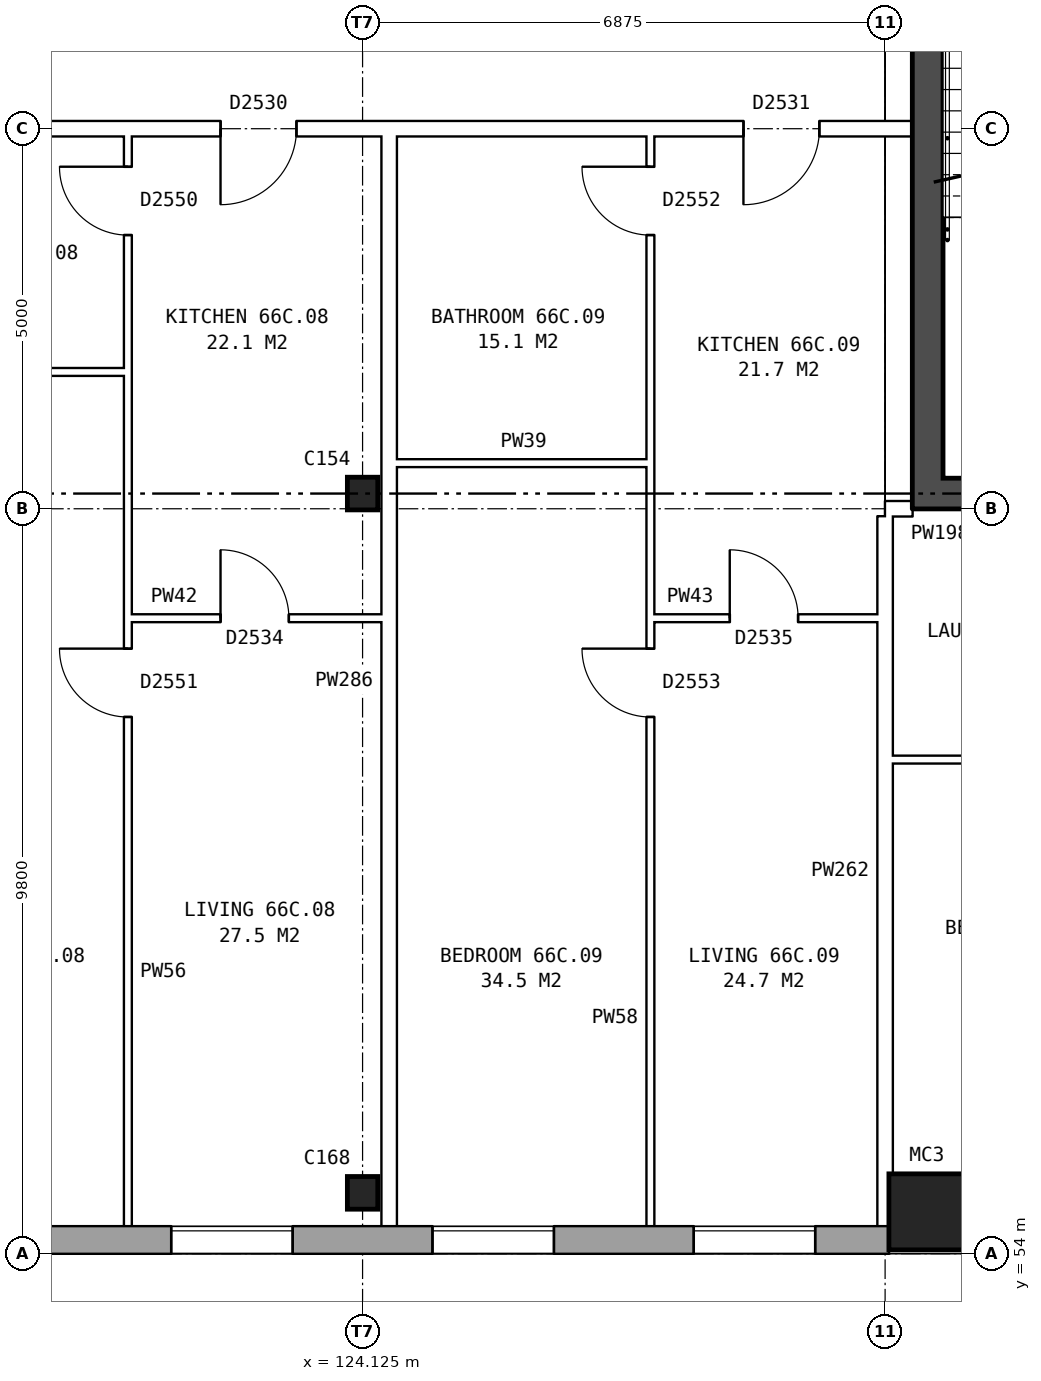
"""IFC4 building model, lengths in metres.
Left out: names, types, materials, properties, quantities, classifications, styles, units other than length and angle.
Written with IfcOpenShell. Run it as: python <this file> out.ifc"""

import sys

from ifc_helpers import new_model, si_unit, direction, frame, frame_2d, origin, origin_2d, place, context, subcontext, project, spatial, rectangle, hollow_rectangle, i_section, extrude, element, fill, save


model = new_model("IFC4")
c1 = context("Model", 3, precision=1e-05, world=origin(), true_north=direction((0.0, 1.0)))
c2 = subcontext(c1, "Body", "Model", "MODEL_VIEW")
j1 = project(units=[si_unit("LENGTHUNIT", "METRE"), si_unit("PLANEANGLEUNIT", "RADIAN")], contexts=[c1])
p1 = place(None, origin())
s1 = spatial("IfcSite", under=j1, at=p1, CompositionType="ELEMENT")
p2 = place(p1, origin())
s2 = spatial("IfcBuilding", under=s1, at=p2, CompositionType="ELEMENT")
p3 = place(p2, frame((0.0, 0.0, 233.8)))
s3 = spatial("IfcBuildingStorey", under=s2, at=p3, CompositionType="ELEMENT", Elevation=233.8)
p4 = place(p3, frame((131.55, 54.55, 0.0), z_axis=(0.0, 0.0, 1.0), x_axis=(1.0, 0.0, 0.0)))
e1 = element("IfcColumn", 1, at=p4, inside=s3, PredefinedType="COLUMN", context=c2, shape_type="SweptSolid", body=[
    extrude(hollow_rectangle(XDim=1.0, YDim=1.0, WallThickness=0.055, at=origin_2d()), origin(), (0.0, 0.0, 1.0), 3.1),
])
for number, where, z_axis, x_axis in (
    (2, (124.125, 54.8, 0.0), (0.0, 0.0, 1.0), (1.0, 0.0, 0.0)),
    (3, (124.125, 64.0, 0.0), (0.0, 0.0, 1.0), (1.0, 0.0, 0.0)),
):
    element("IfcColumn", number, at=place(p3, frame(where, z_axis=z_axis, x_axis=x_axis)), inside=s3, PredefinedType="COLUMN", context=c2, shape_type="SweptSolid", body=[
        extrude(i_section(OverallWidth=0.4, OverallDepth=0.43, WebThickness=0.028, FlangeThickness=0.04, at=origin_2d()), origin(), (0.0, 0.0, 1.0), 2.85),
    ])
p5 = place(p3, frame((75.95, 54.18, 0.0), z_axis=(0.0, 0.0, 1.0), x_axis=(1.0, 0.0, 0.0)))
e4 = element("IfcWall", 4, at=p5, inside=s3, PredefinedType="STANDARD", context=c2, shape_type="SweptSolid", body=[
    extrude(rectangle(XDim=55.1, YDim=0.36, at=frame_2d((27.55, 0.0))), origin(), (0.0, 0.0, 1.0), 2.85),
])
p6 = place(p5, frame((0.969, 0.0, 0.8)))
e5 = element("IfcOpeningElement", 5, at=p6, cuts=e4, PredefinedType="OPENING", context=c2, shape_type="SweptSolid", body=[
    extrude(rectangle(XDim=1.6, YDim=1.8, at=frame_2d((0.8, 0.9))), frame((0.0, 0.19, 0.0), z_axis=(0.0, -1.0, 0.0), x_axis=(1.0, 0.0, 0.0)), (0.0, 0.0, 1.0), 0.38),
])
p7 = place(p5, frame((4.406, 0.0, 0.8)))
e6 = element("IfcOpeningElement", 6, at=p7, cuts=e4, PredefinedType="OPENING", context=c2, shape_type="SweptSolid", body=[
    extrude(rectangle(XDim=1.6, YDim=1.8, at=frame_2d((0.8, 0.9))), frame((0.0, 0.19, 0.0), z_axis=(0.0, -1.0, 0.0), x_axis=(1.0, 0.0, 0.0)), (0.0, 0.0, 1.0), 0.38),
])
p8 = place(p5, frame((7.844, 0.0, 0.8)))
e7 = element("IfcOpeningElement", 7, at=p8, cuts=e4, PredefinedType="OPENING", context=c2, shape_type="SweptSolid", body=[
    extrude(rectangle(XDim=1.6, YDim=1.8, at=frame_2d((0.8, 0.9))), frame((0.0, 0.19, 0.0), z_axis=(0.0, -1.0, 0.0), x_axis=(1.0, 0.0, 0.0)), (0.0, 0.0, 1.0), 0.38),
])
p9 = place(p5, frame((11.281, 0.0, 0.8)))
e8 = element("IfcOpeningElement", 8, at=p9, cuts=e4, PredefinedType="OPENING", context=c2, shape_type="SweptSolid", body=[
    extrude(rectangle(XDim=1.6, YDim=1.8, at=frame_2d((0.8, 0.9))), frame((0.0, 0.19, 0.0), z_axis=(0.0, -1.0, 0.0), x_axis=(1.0, 0.0, 0.0)), (0.0, 0.0, 1.0), 0.38),
])
p10 = place(p5, frame((14.719, 0.0, 0.8)))
e9 = element("IfcOpeningElement", 9, at=p10, cuts=e4, PredefinedType="OPENING", context=c2, shape_type="SweptSolid", body=[
    extrude(rectangle(XDim=1.6, YDim=1.8, at=frame_2d((0.8, 0.9))), frame((0.0, 0.19, 0.0), z_axis=(0.0, -1.0, 0.0), x_axis=(1.0, 0.0, 0.0)), (0.0, 0.0, 1.0), 0.38),
])
p11 = place(p5, frame((18.156, 0.0, 0.8)))
e10 = element("IfcOpeningElement", 10, at=p11, cuts=e4, PredefinedType="OPENING", context=c2, shape_type="SweptSolid", body=[
    extrude(rectangle(XDim=1.6, YDim=1.8, at=frame_2d((0.8, 0.9))), frame((0.0, 0.19, 0.0), z_axis=(0.0, -1.0, 0.0), x_axis=(1.0, 0.0, 0.0)), (0.0, 0.0, 1.0), 0.38),
])
p12 = place(p5, frame((21.594, 0.0, 0.8)))
e11 = element("IfcOpeningElement", 11, at=p12, cuts=e4, PredefinedType="OPENING", context=c2, shape_type="SweptSolid", body=[
    extrude(rectangle(XDim=1.6, YDim=1.8, at=frame_2d((0.8, 0.9))), frame((0.0, 0.19, 0.0), z_axis=(0.0, -1.0, 0.0), x_axis=(1.0, 0.0, 0.0)), (0.0, 0.0, 1.0), 0.38),
])
p13 = place(p5, frame((25.031, 0.0, 0.8)))
e12 = element("IfcOpeningElement", 12, at=p13, cuts=e4, PredefinedType="OPENING", context=c2, shape_type="SweptSolid", body=[
    extrude(rectangle(XDim=1.6, YDim=1.8, at=frame_2d((0.8, 0.9))), frame((0.0, 0.19, 0.0), z_axis=(0.0, -1.0, 0.0), x_axis=(1.0, 0.0, 0.0)), (0.0, 0.0, 1.0), 0.38),
])
p14 = place(p5, frame((28.469, 0.0, 0.8)))
e13 = element("IfcOpeningElement", 13, at=p14, cuts=e4, PredefinedType="OPENING", context=c2, shape_type="SweptSolid", body=[
    extrude(rectangle(XDim=1.6, YDim=1.8, at=frame_2d((0.8, 0.9))), frame((0.0, 0.19, 0.0), z_axis=(0.0, -1.0, 0.0), x_axis=(1.0, 0.0, 0.0)), (0.0, 0.0, 1.0), 0.38),
])
p15 = place(p5, frame((31.906, 0.0, 0.8)))
e14 = element("IfcOpeningElement", 14, at=p15, cuts=e4, PredefinedType="OPENING", context=c2, shape_type="SweptSolid", body=[
    extrude(rectangle(XDim=1.6, YDim=1.8, at=frame_2d((0.8, 0.9))), frame((0.0, 0.19, 0.0), z_axis=(0.0, -1.0, 0.0), x_axis=(1.0, 0.0, 0.0)), (0.0, 0.0, 1.0), 0.38),
])
p16 = place(p5, frame((35.344, 0.0, 0.8)))
e15 = element("IfcOpeningElement", 15, at=p16, cuts=e4, PredefinedType="OPENING", context=c2, shape_type="SweptSolid", body=[
    extrude(rectangle(XDim=1.6, YDim=1.8, at=frame_2d((0.8, 0.9))), frame((0.0, 0.19, 0.0), z_axis=(0.0, -1.0, 0.0), x_axis=(1.0, 0.0, 0.0)), (0.0, 0.0, 1.0), 0.38),
])
p17 = place(p5, frame((38.781, 0.0, 0.8)))
e16 = element("IfcOpeningElement", 16, at=p17, cuts=e4, PredefinedType="OPENING", context=c2, shape_type="SweptSolid", body=[
    extrude(rectangle(XDim=1.6, YDim=1.8, at=frame_2d((0.8, 0.9))), frame((0.0, 0.19, 0.0), z_axis=(0.0, -1.0, 0.0), x_axis=(1.0, 0.0, 0.0)), (0.0, 0.0, 1.0), 0.38),
])
p18 = place(p5, frame((42.219, 0.0, 0.8)))
e17 = element("IfcOpeningElement", 17, at=p18, cuts=e4, PredefinedType="OPENING", context=c2, shape_type="SweptSolid", body=[
    extrude(rectangle(XDim=1.6, YDim=1.8, at=frame_2d((0.8, 0.9))), frame((0.0, 0.19, 0.0), z_axis=(0.0, -1.0, 0.0), x_axis=(1.0, 0.0, 0.0)), (0.0, 0.0, 1.0), 0.38),
])
p19 = place(p5, frame((45.656, 0.0, 0.8)))
e18 = element("IfcOpeningElement", 18, at=p19, cuts=e4, PredefinedType="OPENING", context=c2, shape_type="SweptSolid", body=[
    extrude(rectangle(XDim=1.6, YDim=1.8, at=frame_2d((0.8, 0.9))), frame((0.0, 0.19, 0.0), z_axis=(0.0, -1.0, 0.0), x_axis=(1.0, 0.0, 0.0)), (0.0, 0.0, 1.0), 0.38),
])
p20 = place(p5, frame((49.094, 0.0, 0.8)))
e19 = element("IfcOpeningElement", 19, at=p20, cuts=e4, PredefinedType="OPENING", context=c2, shape_type="SweptSolid", body=[
    extrude(rectangle(XDim=1.6, YDim=1.8, at=frame_2d((0.8, 0.9))), frame((0.0, 0.19, 0.0), z_axis=(0.0, -1.0, 0.0), x_axis=(1.0, 0.0, 0.0)), (0.0, 0.0, 1.0), 0.38),
])
p21 = place(p5, frame((52.531, 0.0, 0.8)))
e20 = element("IfcOpeningElement", 20, at=p21, cuts=e4, PredefinedType="OPENING", context=c2, shape_type="SweptSolid", body=[
    extrude(rectangle(XDim=1.6, YDim=1.8, at=frame_2d((0.8, 0.9))), frame((0.0, 0.19, 0.0), z_axis=(0.0, -1.0, 0.0), x_axis=(1.0, 0.0, 0.0)), (0.0, 0.0, 1.0), 0.38),
])
p22 = place(p3, frame((131.56, 63.8, 0.0), z_axis=(0.0, 0.0, 1.0), x_axis=(0.0, 1.0, 0.0)))
e21 = element("IfcWall", 21, at=p22, inside=s3, PredefinedType="SHEAR", context=c2, shape_type="SweptSolid", body=[
    extrude(rectangle(XDim=12.4, YDim=0.4, at=frame_2d((6.2, 0.0))), origin(), (0.0, 0.0, 1.0), 2.85),
])
p23 = place(p22, frame((9.8, 0.0, 0.0)))
e22 = element("IfcOpeningElement", 22, at=p23, cuts=e21, PredefinedType="OPENING", context=c2, shape_type="SweptSolid", body=[
    extrude(rectangle(XDim=1.1, YDim=2.1, at=frame_2d((0.55, 1.05))), frame((0.0, 0.21, 0.0), z_axis=(0.0, -1.0, 0.0), x_axis=(1.0, 0.0, 0.0)), (0.0, 0.0, 1.0), 0.42),
])
p24 = place(p3, frame((139.36, 64.0, 0.0), z_axis=(0.0, 0.0, 1.0), x_axis=(-1.0, 0.0, 0.0)))
e23 = element("IfcWall", 23, at=p24, inside=s3, PredefinedType="SHEAR", context=c2, shape_type="SweptSolid", body=[
    extrude(rectangle(XDim=7.6, YDim=0.4, at=frame_2d((3.8, 0.0))), origin(), (0.0, 0.0, 1.0), 2.85),
])
p25 = place(p3, frame((131.1, 60.5, 0.0), z_axis=(0.0, 0.0, 1.0), x_axis=(1.0, 0.0, 0.0)))
e24 = element("IfcWall", 24, at=p25, inside=s3, PredefinedType="PARTITIONING", context=c2, shape_type="SweptSolid", body=[
    extrude(rectangle(XDim=5.8, YDim=0.1, at=frame_2d((2.9, 0.0))), origin(), (0.0, 0.0, 1.0), 2.85),
])
p26 = place(p3, frame((121.037, 62.36, 0.0), z_axis=(0.0, 0.0, 1.0), x_axis=(1.0, 0.0, 0.0)))
e25 = element("IfcWall", 25, at=p26, inside=s3, PredefinedType="PARTITIONING", context=c2, shape_type="SweptSolid", body=[
    extrude(rectangle(XDim=3.338, YDim=0.1, at=frame_2d((1.669, 0.0))), origin(), (0.0, 0.0, 1.0), 2.85),
])
p27 = place(p26, frame((1.219, 0.0, 0.0)))
e26 = element("IfcOpeningElement", 26, at=p27, cuts=e25, PredefinedType="OPENING", context=c2, shape_type="SweptSolid", body=[
    extrude(rectangle(XDim=0.9, YDim=2.1, at=frame_2d((0.45, 1.05))), frame((0.0, 0.06, 0.0), z_axis=(0.0, -1.0, 0.0), x_axis=(1.0, 0.0, 0.0)), (0.0, 0.0, 1.0), 0.12),
])
p28 = place(p3, frame((127.912, 62.36, 0.0), z_axis=(0.0, 0.0, 1.0), x_axis=(1.0, 0.0, 0.0)))
e27 = element("IfcWall", 27, at=p28, inside=s3, PredefinedType="PARTITIONING", context=c2, shape_type="SweptSolid", body=[
    extrude(rectangle(XDim=2.988, YDim=0.1, at=frame_2d((1.494, 0.0))), origin(), (0.0, 0.0, 1.0), 2.85),
])
p29 = place(p28, frame((1.044, 0.0, 0.0)))
e28 = element("IfcOpeningElement", 28, at=p29, cuts=e27, PredefinedType="OPENING", context=c2, shape_type="SweptSolid", body=[
    extrude(rectangle(XDim=0.9, YDim=2.1, at=frame_2d((0.45, 1.05))), frame((0.0, 0.06, 0.0), z_axis=(0.0, -1.0, 0.0), x_axis=(1.0, 0.0, 0.0)), (0.0, 0.0, 1.0), 0.12),
])
p30 = place(p3, frame((131.0, 63.8, 0.0), z_axis=(0.0, 0.0, 1.0), x_axis=(1.0, 0.0, 0.0)))
e29 = element("IfcWall", 29, at=p30, inside=s3, PredefinedType="PARTITIONING", context=c2, shape_type="SweptSolid", body=[
    extrude(rectangle(XDim=0.36, YDim=0.2, at=frame_2d((0.18, 0.0))), origin(), (0.0, 0.0, 1.0), 2.85),
])
for number, where, z_axis, x_axis in (
    (30, (124.575, 64.4, 0.0), (0.0, 0.0, 1.0), (1.0, 0.0, 0.0)),
    (31, (117.7, 65.6, 0.0), (0.0, 0.0, 1.0), (1.0, 0.0, 0.0)),
):
    element("IfcWall", number, at=place(p3, frame(where, z_axis=z_axis, x_axis=x_axis)), inside=s3, PredefinedType="PARTITIONING", context=c2, shape_type="SweptSolid", body=[
        extrude(rectangle(XDim=3.337, YDim=0.1, at=frame_2d((1.668, 0.0))), origin(), (0.0, 0.0, 1.0), 2.85),
    ])
p31 = place(p3, frame((75.64, 68.8, 0.0), z_axis=(0.0, 0.0, 1.0), x_axis=(1.0, 0.0, 0.0)))
e32 = element("IfcWall", 32, at=p31, inside=s3, PredefinedType="PARTITIONING", context=c2, shape_type="SweptSolid", body=[
    extrude(rectangle(XDim=55.72, YDim=0.2, at=frame_2d((27.86, 0.0))), origin(), (0.0, 0.0, 1.0), 2.85),
])
p32 = place(p31, frame((5.191, 0.0, 0.0)))
e33 = element("IfcOpeningElement", 33, at=p32, cuts=e32, PredefinedType="OPENING", context=c2, shape_type="SweptSolid", body=[
    extrude(rectangle(XDim=1.0, YDim=2.1, at=frame_2d((0.5, 1.05))), frame((0.0, 0.11, 0.0), z_axis=(0.0, -1.0, 0.0), x_axis=(1.0, 0.0, 0.0)), (0.0, 0.0, 1.0), 0.22),
])
p33 = place(p31, frame((12.241, 0.0, 0.0)))
e34 = element("IfcOpeningElement", 34, at=p33, cuts=e32, PredefinedType="OPENING", context=c2, shape_type="SweptSolid", body=[
    extrude(rectangle(XDim=1.0, YDim=2.1, at=frame_2d((0.5, 1.05))), frame((0.0, 0.11, 0.0), z_axis=(0.0, -1.0, 0.0), x_axis=(1.0, 0.0, 0.0)), (0.0, 0.0, 1.0), 0.22),
])
p34 = place(p31, frame((22.553, 0.0, 0.0)))
e35 = element("IfcOpeningElement", 35, at=p34, cuts=e32, PredefinedType="OPENING", context=c2, shape_type="SweptSolid", body=[
    extrude(rectangle(XDim=1.0, YDim=2.1, at=frame_2d((0.5, 1.05))), frame((0.0, 0.11, 0.0), z_axis=(0.0, -1.0, 0.0), x_axis=(1.0, 0.0, 0.0)), (0.0, 0.0, 1.0), 0.22),
])
p35 = place(p31, frame((32.866, 0.0, 0.0)))
e36 = element("IfcOpeningElement", 36, at=p35, cuts=e32, PredefinedType="OPENING", context=c2, shape_type="SweptSolid", body=[
    extrude(rectangle(XDim=1.0, YDim=2.1, at=frame_2d((0.5, 1.05))), frame((0.0, 0.11, 0.0), z_axis=(0.0, -1.0, 0.0), x_axis=(1.0, 0.0, 0.0)), (0.0, 0.0, 1.0), 0.22),
])
p36 = place(p31, frame((36.303, 0.0, 0.0)))
e37 = element("IfcOpeningElement", 37, at=p36, cuts=e32, PredefinedType="OPENING", context=c2, shape_type="SweptSolid", body=[
    extrude(rectangle(XDim=1.0, YDim=2.1, at=frame_2d((0.5, 1.05))), frame((0.0, 0.11, 0.0), z_axis=(0.0, -1.0, 0.0), x_axis=(1.0, 0.0, 0.0)), (0.0, 0.0, 1.0), 0.22),
])
p37 = place(p31, frame((46.616, 0.0, 0.0)))
e38 = element("IfcOpeningElement", 38, at=p37, cuts=e32, PredefinedType="OPENING", context=c2, shape_type="SweptSolid", body=[
    extrude(rectangle(XDim=1.0, YDim=2.1, at=frame_2d((0.5, 1.05))), frame((0.0, 0.11, 0.0), z_axis=(0.0, -1.0, 0.0), x_axis=(1.0, 0.0, 0.0)), (0.0, 0.0, 1.0), 0.22),
])
p38 = place(p31, frame((53.496, 0.0, 0.0)))
e39 = element("IfcOpeningElement", 39, at=p38, cuts=e32, PredefinedType="OPENING", context=c2, shape_type="SweptSolid", body=[
    extrude(rectangle(XDim=1.0, YDim=2.1, at=frame_2d((0.5, 1.05))), frame((0.0, 0.11, 0.0), z_axis=(0.0, -1.0, 0.0), x_axis=(1.0, 0.0, 0.0)), (0.0, 0.0, 1.0), 0.22),
])
p39 = place(p3, frame((121.037, 54.36, 0.0), z_axis=(0.0, 0.0, 1.0), x_axis=(0.0, 1.0, 0.0)))
e40 = element("IfcWall", 40, at=p39, inside=s3, PredefinedType="PARTITIONING", context=c2, shape_type="SweptSolid", body=[
    extrude(rectangle(XDim=14.34, YDim=0.1, at=frame_2d((7.17, 0.0))), origin(), (0.0, 0.0, 1.0), 2.85),
])
p40 = place(p39, frame((6.7, 0.0, 0.0)))
e41 = element("IfcOpeningElement", 41, at=p40, cuts=e40, PredefinedType="OPENING", context=c2, shape_type="SweptSolid", body=[
    extrude(rectangle(XDim=0.9, YDim=2.1, at=frame_2d((0.45, 1.05))), frame((0.0, 0.06, 0.0), z_axis=(0.0, -1.0, 0.0), x_axis=(1.0, 0.0, 0.0)), (0.0, 0.0, 1.0), 0.12),
])
p41 = place(p39, frame((13.04, 0.0, 0.0)))
e42 = element("IfcOpeningElement", 42, at=p41, cuts=e40, PredefinedType="OPENING", context=c2, shape_type="SweptSolid", body=[
    extrude(rectangle(XDim=0.9, YDim=2.1, at=frame_2d((0.45, 1.05))), frame((0.0, 0.06, 0.0), z_axis=(0.0, -1.0, 0.0), x_axis=(1.0, 0.0, 0.0)), (0.0, 0.0, 1.0), 0.12),
])
p42 = place(p3, frame((124.475, 54.36, 0.0), z_axis=(0.0, 0.0, 1.0), x_axis=(0.0, 1.0, 0.0)))
e43 = element("IfcWall", 43, at=p42, inside=s3, PredefinedType="PARTITIONING", context=c2, shape_type="SweptSolid", body=[
    extrude(rectangle(XDim=14.34, YDim=0.2, at=frame_2d((7.17, 0.0))), origin(), (0.0, 0.0, 1.0), 2.85),
])
p43 = place(p3, frame((127.912, 54.36, 0.0), z_axis=(0.0, 0.0, 1.0), x_axis=(0.0, 1.0, 0.0)))
e44 = element("IfcWall", 44, at=p43, inside=s3, PredefinedType="PARTITIONING", context=c2, shape_type="SweptSolid", body=[
    extrude(rectangle(XDim=14.34, YDim=0.1, at=frame_2d((7.17, 0.0))), origin(), (0.0, 0.0, 1.0), 2.85),
])
p44 = place(p43, frame((6.7, 0.0, 0.0)))
e45 = element("IfcOpeningElement", 45, at=p44, cuts=e44, PredefinedType="OPENING", context=c2, shape_type="SweptSolid", body=[
    extrude(rectangle(XDim=0.9, YDim=2.1, at=frame_2d((0.45, 1.05))), frame((0.0, 0.06, 0.0), z_axis=(0.0, -1.0, 0.0), x_axis=(1.0, 0.0, 0.0)), (0.0, 0.0, 1.0), 0.12),
])
p45 = place(p43, frame((13.04, 0.0, 0.0)))
e46 = element("IfcOpeningElement", 46, at=p45, cuts=e44, PredefinedType="OPENING", context=c2, shape_type="SweptSolid", body=[
    extrude(rectangle(XDim=0.9, YDim=2.1, at=frame_2d((0.45, 1.05))), frame((0.0, 0.06, 0.0), z_axis=(0.0, -1.0, 0.0), x_axis=(1.0, 0.0, 0.0)), (0.0, 0.0, 1.0), 0.12),
])
p46 = place(p3, frame((131.0, 54.36, 0.0), z_axis=(0.0, 0.0, 1.0), x_axis=(0.0, 1.0, 0.0)))
e47 = element("IfcWall", 47, at=p46, inside=s3, PredefinedType="PARTITIONING", context=c2, shape_type="SweptSolid", body=[
    extrude(rectangle(XDim=9.34, YDim=0.2, at=frame_2d((4.67, 0.0))), origin(), (0.0, 0.0, 1.0), 2.85),
])
p47 = place(p19, origin())
e48 = element("IfcWindow", 48, at=p47, inside=s3, PartitioningType="SINGLE_PANEL", PredefinedType="WINDOW", context=c2, shape_type="SweptSolid", body=[
    extrude(rectangle(XDim=1.6, YDim=1.8, at=frame_2d((0.8, 0.9))), frame((0.0, 0.15, 0.0), z_axis=(0.0, -1.0, 0.0), x_axis=(1.0, 0.0, 0.0)), (0.0, 0.0, 1.0), 0.06),
])
fill(e18, e48)
p48 = place(p20, origin())
e49 = element("IfcWindow", 49, at=p48, inside=s3, PartitioningType="SINGLE_PANEL", PredefinedType="WINDOW", context=c2, shape_type="SweptSolid", body=[
    extrude(rectangle(XDim=1.6, YDim=1.8, at=frame_2d((0.8, 0.9))), frame((0.0, 0.15, 0.0), z_axis=(0.0, -1.0, 0.0), x_axis=(1.0, 0.0, 0.0)), (0.0, 0.0, 1.0), 0.06),
])
fill(e19, e49)
p49 = place(p21, origin())
e50 = element("IfcWindow", 50, at=p49, inside=s3, PartitioningType="SINGLE_PANEL", PredefinedType="WINDOW", context=c2, shape_type="SweptSolid", body=[
    extrude(rectangle(XDim=1.6, YDim=1.8, at=frame_2d((0.8, 0.9))), frame((0.0, 0.15, 0.0), z_axis=(0.0, -1.0, 0.0), x_axis=(1.0, 0.0, 0.0)), (0.0, 0.0, 1.0), 0.06),
])
fill(e20, e50)
p50 = place(p40, origin())
e51 = element("IfcDoor", 51, at=p50, inside=s3, OperationType="SINGLE_SWING_RIGHT", PredefinedType="DOOR", context=c2, shape_type="SweptSolid", body=[
    extrude(rectangle(XDim=0.9, YDim=2.1, at=frame_2d((0.45, 1.05))), frame((0.0, 0.025, 0.0), z_axis=(0.0, -1.0, 0.0), x_axis=(1.0, 0.0, 0.0)), (0.0, 0.0, 1.0), 0.05),
])
fill(e41, e51)
p51 = place(p37, frame((1.0, 0.0, 0.0), z_axis=(0.0, 0.0, 1.0), x_axis=(-1.0, 0.0, 0.0)))
e52 = element("IfcDoor", 52, at=p51, inside=s3, OperationType="SINGLE_SWING_RIGHT", PredefinedType="DOOR", context=c2, shape_type="SweptSolid", body=[
    extrude(rectangle(XDim=1.0, YDim=2.1, at=frame_2d((0.5, 1.05))), frame((0.0, 0.025, 0.0), z_axis=(0.0, -1.0, 0.0), x_axis=(1.0, 0.0, 0.0)), (0.0, 0.0, 1.0), 0.05),
])
fill(e38, e52)
p52 = place(p27, origin())
e53 = element("IfcDoor", 53, at=p52, inside=s3, OperationType="SINGLE_SWING_LEFT", PredefinedType="DOOR", context=c2, shape_type="SweptSolid", body=[
    extrude(rectangle(XDim=0.9, YDim=2.1, at=frame_2d((0.45, 1.05))), frame((0.0, 0.025, 0.0), z_axis=(0.0, -1.0, 0.0), x_axis=(1.0, 0.0, 0.0)), (0.0, 0.0, 1.0), 0.05),
])
fill(e26, e53)
p53 = place(p41, origin())
e54 = element("IfcDoor", 54, at=p53, inside=s3, OperationType="SINGLE_SWING_RIGHT", PredefinedType="DOOR", context=c2, shape_type="SweptSolid", body=[
    extrude(rectangle(XDim=0.9, YDim=2.1, at=frame_2d((0.45, 1.05))), frame((0.0, 0.025, 0.0), z_axis=(0.0, -1.0, 0.0), x_axis=(1.0, 0.0, 0.0)), (0.0, 0.0, 1.0), 0.05),
])
fill(e42, e54)
p54 = place(p44, origin())
e55 = element("IfcDoor", 55, at=p54, inside=s3, OperationType="SINGLE_SWING_RIGHT", PredefinedType="DOOR", context=c2, shape_type="SweptSolid", body=[
    extrude(rectangle(XDim=0.9, YDim=2.1, at=frame_2d((0.45, 1.05))), frame((0.0, 0.025, 0.0), z_axis=(0.0, -1.0, 0.0), x_axis=(1.0, 0.0, 0.0)), (0.0, 0.0, 1.0), 0.05),
])
fill(e45, e55)
p55 = place(p38, frame((1.0, 0.0, 0.0), z_axis=(0.0, 0.0, 1.0), x_axis=(-1.0, 0.0, 0.0)))
e56 = element("IfcDoor", 56, at=p55, inside=s3, OperationType="SINGLE_SWING_RIGHT", PredefinedType="DOOR", context=c2, shape_type="SweptSolid", body=[
    extrude(rectangle(XDim=1.0, YDim=2.1, at=frame_2d((0.5, 1.05))), frame((0.0, 0.025, 0.0), z_axis=(0.0, -1.0, 0.0), x_axis=(1.0, 0.0, 0.0)), (0.0, 0.0, 1.0), 0.05),
])
fill(e39, e56)
p56 = place(p29, origin())
e57 = element("IfcDoor", 57, at=p56, inside=s3, OperationType="SINGLE_SWING_LEFT", PredefinedType="DOOR", context=c2, shape_type="SweptSolid", body=[
    extrude(rectangle(XDim=0.9, YDim=2.1, at=frame_2d((0.45, 1.05))), frame((0.0, 0.025, 0.0), z_axis=(0.0, -1.0, 0.0), x_axis=(1.0, 0.0, 0.0)), (0.0, 0.0, 1.0), 0.05),
])
fill(e28, e57)
p57 = place(p45, origin())
e58 = element("IfcDoor", 58, at=p57, inside=s3, OperationType="SINGLE_SWING_RIGHT", PredefinedType="DOOR", context=c2, shape_type="SweptSolid", body=[
    extrude(rectangle(XDim=0.9, YDim=2.1, at=frame_2d((0.45, 1.05))), frame((0.0, 0.025, 0.0), z_axis=(0.0, -1.0, 0.0), x_axis=(1.0, 0.0, 0.0)), (0.0, 0.0, 1.0), 0.05),
])
fill(e46, e58)
save(model, sys.argv[1])
